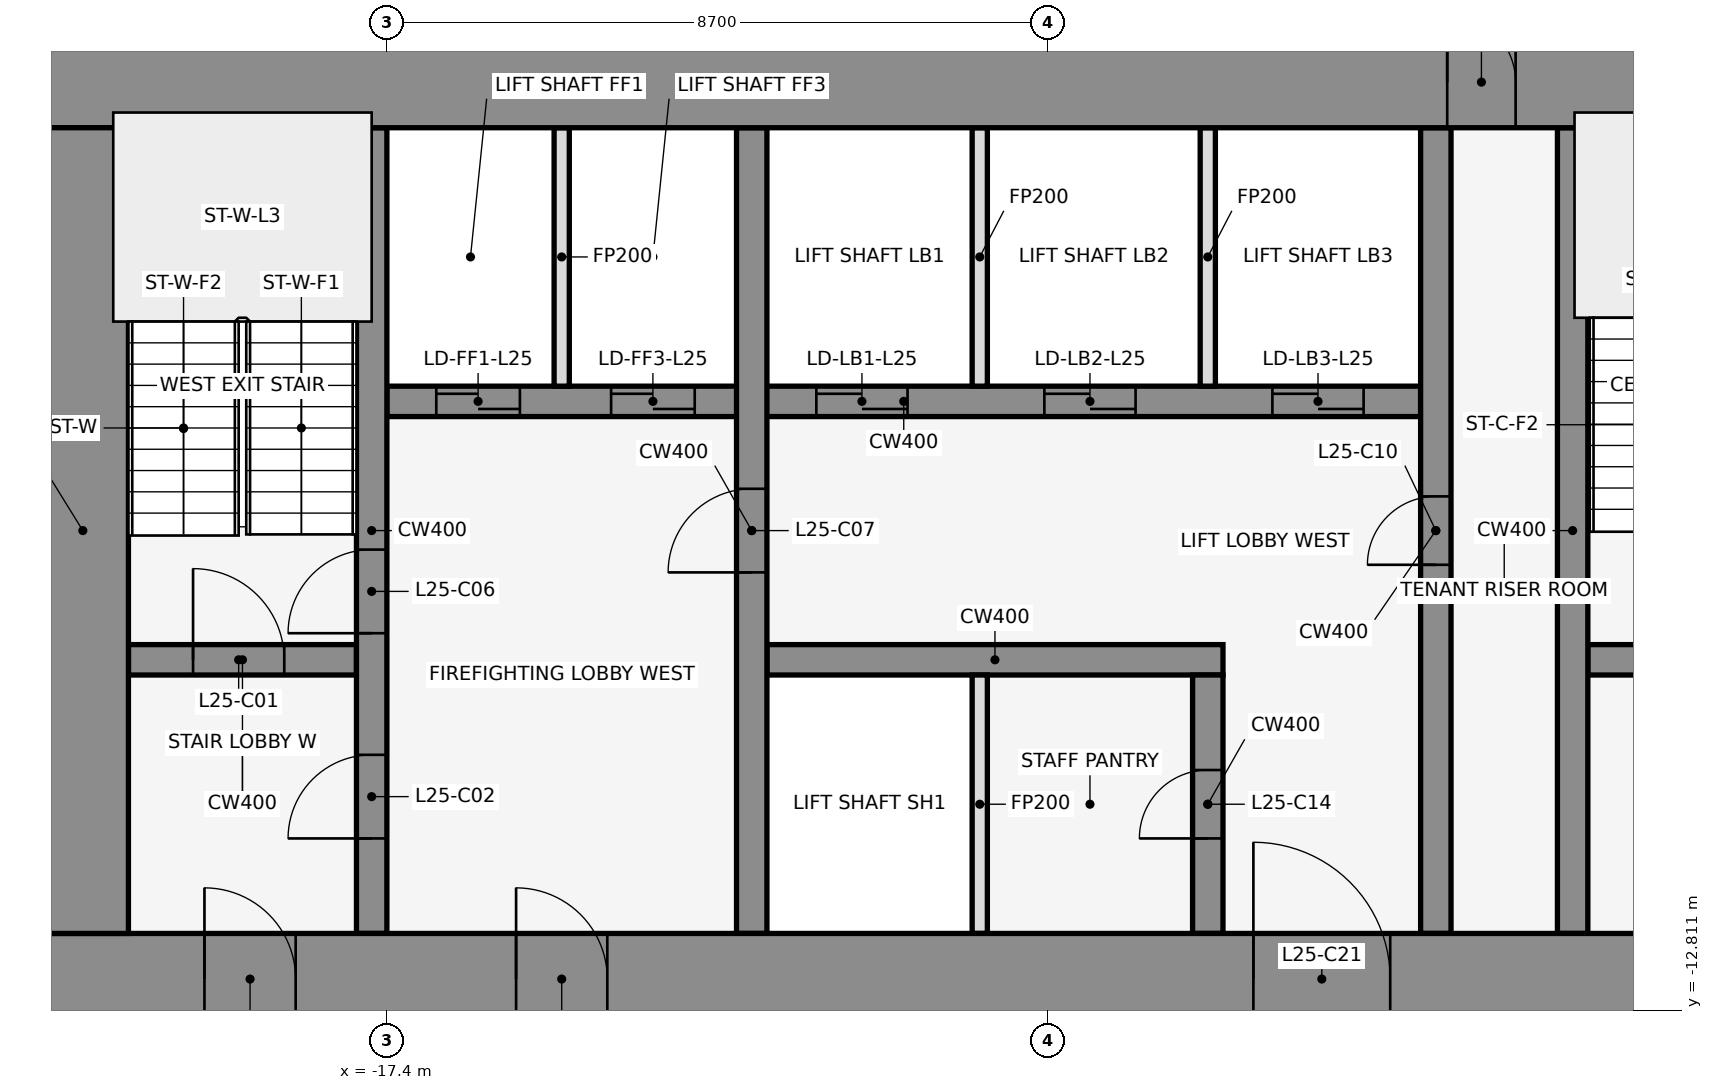
"""IFC4 building model, lengths in metres.
Left out: names, types, materials, properties, quantities, classifications, styles, units other than length and angle.
Written with IfcOpenShell. Run it as: python <this file> out.ifc"""

import sys

from ifc_helpers import new_model, si_unit, direction, frame, frame_2d, origin, place, context, subcontext, project, spatial, rectangle, extrude, element, fill, save


model = new_model("IFC4")
c1 = context("Model", 3, precision=1e-05, world=origin(), true_north=direction((0.0, 1.0)))
c2 = subcontext(c1, "Body", "Model", "MODEL_VIEW")
j1 = project(units=[si_unit("LENGTHUNIT", "METRE"), si_unit("PLANEANGLEUNIT", "RADIAN")], contexts=[c1])
p1 = place(None, origin())
s1 = spatial("IfcSite", under=j1, at=p1, CompositionType="ELEMENT")
p2 = place(p1, origin())
s2 = spatial("IfcBuilding", under=s1, at=p2, CompositionType="ELEMENT")
p3 = place(p2, frame((0.0, 0.0, 118.6)))
s3 = spatial("IfcBuildingStorey", under=s2, at=p3, CompositionType="ELEMENT", Elevation=118.6)
for number, where, z_axis, x_axis in (
    (1, (-0.068, -0.105, 0.0), (0.0, 0.0, 1.0), (-0.84, 0.543, 0.0)),
    (2, (-14.599, 1.08, 0.0), (0.0, 0.0, 1.0), (-0.84, -0.543, 0.0)),
):
    element("IfcWall", number, at=place(p3, frame(where, z_axis=z_axis, x_axis=x_axis)), inside=s3, PredefinedType="STANDARD", context=c2, shape_type="SweptSolid", body=[
        extrude(rectangle(XDim=2.183, YDim=0.25, at=frame_2d((1.091, 0.0))), origin(), (0.0, 0.0, 1.0), 3.95),
    ])
p4 = place(p3, frame((-20.8, -8.2, 0.0), z_axis=(0.0, 0.0, 1.0), x_axis=(1.0, 0.0, 0.0)))
e3 = element("IfcWall", 3, at=p4, inside=s3, PredefinedType="SHEAR", context=c2, shape_type="SweptSolid", body=[
    extrude(rectangle(XDim=3.0, YDim=0.4, at=frame_2d((1.5, 0.0))), origin(), (0.0, 0.0, 1.0), 4.1),
])
p5 = place(p4, frame((0.85, 0.0, 0.0)))
e4 = element("IfcOpeningElement", 4, at=p5, cuts=e3, PredefinedType="OPENING", context=c2, shape_type="SweptSolid", body=[
    extrude(rectangle(XDim=1.2, YDim=2.1, at=frame_2d((0.6, 1.05))), frame((0.0, 0.212, 0.0), z_axis=(0.0, -1.0, 0.0), x_axis=(1.0, 0.0, 0.0)), (0.0, 0.0, 1.0), 0.424),
])
p6 = place(p3, frame((-12.4, -8.2, 0.0), z_axis=(0.0, 0.0, 1.0), x_axis=(1.0, 0.0, 0.0)))
e5 = element("IfcWall", 5, at=p6, inside=s3, PredefinedType="SHEAR", context=c2, shape_type="SweptSolid", body=[
    extrude(rectangle(XDim=6.0, YDim=0.4, at=frame_2d((3.0, 0.0))), origin(), (0.0, 0.0, 1.0), 4.1),
])
p7 = place(p3, frame((-1.6, -8.2, 0.0), z_axis=(0.0, 0.0, 1.0), x_axis=(1.0, 0.0, 0.0)))
e6 = element("IfcWall", 6, at=p7, inside=s3, PredefinedType="SHEAR", context=c2, shape_type="SweptSolid", body=[
    extrude(rectangle(XDim=3.2, YDim=0.4, at=frame_2d((1.6, 0.0))), origin(), (0.0, 0.0, 1.0), 4.1),
])
p8 = place(p7, frame((1.05, 0.0, 0.0)))
e7 = element("IfcOpeningElement", 7, at=p8, cuts=e6, PredefinedType="OPENING", context=c2, shape_type="SweptSolid", body=[
    extrude(rectangle(XDim=1.2, YDim=2.1, at=frame_2d((0.6, 1.05))), frame((0.0, 0.212, 0.0), z_axis=(0.0, -1.0, 0.0), x_axis=(1.0, 0.0, 0.0)), (0.0, 0.0, 1.0), 0.424),
])
p9 = place(p3, frame((-17.4, -4.8, 0.0), z_axis=(0.0, 0.0, 1.0), x_axis=(1.0, 0.0, 0.0)))
e8 = element("IfcWall", 8, at=p9, inside=s3, PredefinedType="SHEAR", context=c2, shape_type="SweptSolid", body=[
    extrude(rectangle(XDim=13.6, YDim=0.4, at=frame_2d((6.8, 0.0))), origin(), (0.0, 0.0, 1.0), 4.1),
])
p10 = place(p9, frame((0.65, 0.0, 0.0)))
e9 = element("IfcOpeningElement", 9, at=p10, cuts=e8, PredefinedType="OPENING", context=c2, shape_type="SweptSolid", body=[
    extrude(rectangle(XDim=1.1, YDim=2.1, at=frame_2d((0.55, 1.05))), frame((0.0, 0.212, 0.0), z_axis=(0.0, -1.0, 0.0), x_axis=(1.0, 0.0, 0.0)), (0.0, 0.0, 1.0), 0.424),
])
p11 = place(p9, frame((2.95, 0.0, 0.0)))
e10 = element("IfcOpeningElement", 10, at=p11, cuts=e8, PredefinedType="OPENING", context=c2, shape_type="SweptSolid", body=[
    extrude(rectangle(XDim=1.1, YDim=2.1, at=frame_2d((0.55, 1.05))), frame((0.0, 0.212, 0.0), z_axis=(0.0, -1.0, 0.0), x_axis=(1.0, 0.0, 0.0)), (0.0, 0.0, 1.0), 0.424),
])
p12 = place(p9, frame((5.65, 0.0, 0.0)))
e11 = element("IfcOpeningElement", 11, at=p12, cuts=e8, PredefinedType="OPENING", context=c2, shape_type="SweptSolid", body=[
    extrude(rectangle(XDim=1.2, YDim=2.1, at=frame_2d((0.6, 1.05))), frame((0.0, 0.212, 0.0), z_axis=(0.0, -1.0, 0.0), x_axis=(1.0, 0.0, 0.0)), (0.0, 0.0, 1.0), 0.424),
])
p13 = place(p9, frame((8.65, 0.0, 0.0)))
e12 = element("IfcOpeningElement", 12, at=p13, cuts=e8, PredefinedType="OPENING", context=c2, shape_type="SweptSolid", body=[
    extrude(rectangle(XDim=1.2, YDim=2.1, at=frame_2d((0.6, 1.05))), frame((0.0, 0.212, 0.0), z_axis=(0.0, -1.0, 0.0), x_axis=(1.0, 0.0, 0.0)), (0.0, 0.0, 1.0), 0.424),
])
p14 = place(p9, frame((11.65, 0.0, 0.0)))
e13 = element("IfcOpeningElement", 13, at=p14, cuts=e8, PredefinedType="OPENING", context=c2, shape_type="SweptSolid", body=[
    extrude(rectangle(XDim=1.2, YDim=2.1, at=frame_2d((0.6, 1.05))), frame((0.0, 0.212, 0.0), z_axis=(0.0, -1.0, 0.0), x_axis=(1.0, 0.0, 0.0)), (0.0, 0.0, 1.0), 0.424),
])
p15 = place(p3, frame((-17.6, -11.8, 0.0), z_axis=(0.0, 0.0, 1.0), x_axis=(0.0, 1.0, 0.0)))
e14 = element("IfcWall", 14, at=p15, inside=s3, PredefinedType="SHEAR", context=c2, shape_type="SweptSolid", body=[
    extrude(rectangle(XDim=10.6, YDim=0.4, at=frame_2d((5.3, 0.0))), origin(), (0.0, 0.0, 1.0), 4.1),
])
p16 = place(p15, frame((1.25, 0.0, 0.0)))
e15 = element("IfcOpeningElement", 15, at=p16, cuts=e14, PredefinedType="OPENING", context=c2, shape_type="SweptSolid", body=[
    extrude(rectangle(XDim=1.1, YDim=2.1, at=frame_2d((0.55, 1.05))), frame((0.0, 0.212, 0.0), z_axis=(0.0, -1.0, 0.0), x_axis=(1.0, 0.0, 0.0)), (0.0, 0.0, 1.0), 0.424),
])
p17 = place(p15, frame((3.95, 0.0, 0.0)))
e16 = element("IfcOpeningElement", 16, at=p17, cuts=e14, PredefinedType="OPENING", context=c2, shape_type="SweptSolid", body=[
    extrude(rectangle(XDim=1.1, YDim=2.1, at=frame_2d((0.55, 1.05))), frame((0.0, 0.212, 0.0), z_axis=(0.0, -1.0, 0.0), x_axis=(1.0, 0.0, 0.0)), (0.0, 0.0, 1.0), 0.424),
])
p18 = place(p3, frame((-15.1, -4.6, 0.0), z_axis=(0.0, 0.0, 1.0), x_axis=(0.0, 1.0, 0.0)))
e17 = element("IfcWall", 17, at=p18, inside=s3, PredefinedType="PARTITIONING", context=c2, shape_type="SweptSolid", body=[
    extrude(rectangle(XDim=3.4, YDim=0.2, at=frame_2d((1.7, 0.0))), origin(), (0.0, 0.0, 1.0), 3.018),
])
p19 = place(p3, frame((-12.6, -11.8, 0.0), z_axis=(0.0, 0.0, 1.0), x_axis=(0.0, 1.0, 0.0)))
e18 = element("IfcWall", 18, at=p19, inside=s3, PredefinedType="SHEAR", context=c2, shape_type="SweptSolid", body=[
    extrude(rectangle(XDim=10.6, YDim=0.4, at=frame_2d((5.3, 0.0))), origin(), (0.0, 0.0, 1.0), 4.1),
])
p20 = place(p19, frame((4.75, 0.0, 0.0)))
e19 = element("IfcOpeningElement", 19, at=p20, cuts=e18, PredefinedType="OPENING", context=c2, shape_type="SweptSolid", body=[
    extrude(rectangle(XDim=1.1, YDim=2.1, at=frame_2d((0.55, 1.05))), frame((0.0, 0.212, 0.0), z_axis=(0.0, -1.0, 0.0), x_axis=(1.0, 0.0, 0.0)), (0.0, 0.0, 1.0), 0.424),
])
for number, where, z_axis, x_axis in (
    (20, (-9.6, -11.8, 0.0), (0.0, 0.0, 1.0), (0.0, 1.0, 0.0)),
    (21, (-9.6, -4.6, 0.0), (0.0, 0.0, 1.0), (0.0, 1.0, 0.0)),
):
    element("IfcWall", number, at=place(p3, frame(where, z_axis=z_axis, x_axis=x_axis)), inside=s3, PredefinedType="PARTITIONING", context=c2, shape_type="SweptSolid", body=[
        extrude(rectangle(XDim=3.4, YDim=0.2, at=frame_2d((1.7, 0.0))), origin(), (0.0, 0.0, 1.0), 3.018),
    ])
p21 = place(p3, frame((-6.6, -11.8, 0.0), z_axis=(0.0, 0.0, 1.0), x_axis=(0.0, 1.0, 0.0)))
e22 = element("IfcWall", 22, at=p21, inside=s3, PredefinedType="SHEAR", context=c2, shape_type="SweptSolid", body=[
    extrude(rectangle(XDim=3.4, YDim=0.4, at=frame_2d((1.7, 0.0))), origin(), (0.0, 0.0, 1.0), 4.1),
])
p22 = place(p21, frame((1.25, 0.0, 0.0)))
e23 = element("IfcOpeningElement", 23, at=p22, cuts=e22, PredefinedType="OPENING", context=c2, shape_type="SweptSolid", body=[
    extrude(rectangle(XDim=0.9, YDim=2.1, at=frame_2d((0.45, 1.05))), frame((0.0, 0.212, 0.0), z_axis=(0.0, -1.0, 0.0), x_axis=(1.0, 0.0, 0.0)), (0.0, 0.0, 1.0), 0.424),
])
p23 = place(p3, frame((-6.6, -4.6, 0.0), z_axis=(0.0, 0.0, 1.0), x_axis=(0.0, 1.0, 0.0)))
e24 = element("IfcWall", 24, at=p23, inside=s3, PredefinedType="PARTITIONING", context=c2, shape_type="SweptSolid", body=[
    extrude(rectangle(XDim=3.4, YDim=0.2, at=frame_2d((1.7, 0.0))), origin(), (0.0, 0.0, 1.0), 3.018),
])
p24 = place(p3, frame((-3.6, -11.8, 0.0), z_axis=(0.0, 0.0, 1.0), x_axis=(0.0, 1.0, 0.0)))
e25 = element("IfcWall", 25, at=p24, inside=s3, PredefinedType="SHEAR", context=c2, shape_type="SweptSolid", body=[
    extrude(rectangle(XDim=10.6, YDim=0.4, at=frame_2d((5.3, 0.0))), origin(), (0.0, 0.0, 1.0), 4.1),
])
p25 = place(p24, frame((4.85, 0.0, 0.0)))
e26 = element("IfcOpeningElement", 26, at=p25, cuts=e25, PredefinedType="OPENING", context=c2, shape_type="SweptSolid", body=[
    extrude(rectangle(XDim=0.9, YDim=2.1, at=frame_2d((0.45, 1.05))), frame((0.0, 0.212, 0.0), z_axis=(0.0, -1.0, 0.0), x_axis=(1.0, 0.0, 0.0)), (0.0, 0.0, 1.0), 0.424),
])
p26 = place(p3, frame((-1.8, -11.8, 0.0), z_axis=(0.0, 0.0, 1.0), x_axis=(0.0, 1.0, 0.0)))
e27 = element("IfcWall", 27, at=p26, inside=s3, PredefinedType="SHEAR", context=c2, shape_type="SweptSolid", body=[
    extrude(rectangle(XDim=10.6, YDim=0.4, at=frame_2d((5.3, 0.0))), origin(), (0.0, 0.0, 1.0), 4.1),
])
p27 = place(p3, frame((-22.0, -0.6, 0.0), z_axis=(0.0, 0.0, 1.0), x_axis=(1.0, 0.0, 0.0)))
e28 = element("IfcWall", 28, at=p27, inside=s3, PredefinedType="SHEAR", context=c2, shape_type="SweptSolid", body=[
    extrude(rectangle(XDim=44.0, YDim=1.2, at=frame_2d((22.0, 0.0))), origin(), (0.0, 0.0, 1.0), 4.1),
])
p28 = place(p27, frame((18.55, 0.0, 0.0)))
e29 = element("IfcOpeningElement", 29, at=p28, cuts=e28, PredefinedType="OPENING", context=c2, shape_type="SweptSolid", body=[
    extrude(rectangle(XDim=0.9, YDim=2.1, at=frame_2d((0.45, 1.05))), frame((0.0, 0.612, 0.0), z_axis=(0.0, -1.0, 0.0), x_axis=(1.0, 0.0, 0.0)), (0.0, 0.0, 1.0), 1.224),
])
p29 = place(p27, frame((24.55, 0.0, 0.0)))
e30 = element("IfcOpeningElement", 30, at=p29, cuts=e28, PredefinedType="OPENING", context=c2, shape_type="SweptSolid", body=[
    extrude(rectangle(XDim=0.9, YDim=2.1, at=frame_2d((0.45, 1.05))), frame((0.0, 0.612, 0.0), z_axis=(0.0, -1.0, 0.0), x_axis=(1.0, 0.0, 0.0)), (0.0, 0.0, 1.0), 1.224),
])
p30 = place(p3, frame((-22.0, -12.4, 0.0), z_axis=(0.0, 0.0, 1.0), x_axis=(1.0, 0.0, 0.0)))
e31 = element("IfcWall", 31, at=p30, inside=s3, PredefinedType="SHEAR", context=c2, shape_type="SweptSolid", body=[
    extrude(rectangle(XDim=44.0, YDim=1.2, at=frame_2d((22.0, 0.0))), origin(), (0.0, 0.0, 1.0), 4.1),
])
p31 = place(p30, frame((2.2, 0.0, 0.0)))
e32 = element("IfcOpeningElement", 32, at=p31, cuts=e31, PredefinedType="OPENING", context=c2, shape_type="SweptSolid", body=[
    extrude(rectangle(XDim=1.2, YDim=2.1, at=frame_2d((0.6, 1.05))), frame((0.0, 0.612, 0.0), z_axis=(0.0, -1.0, 0.0), x_axis=(1.0, 0.0, 0.0)), (0.0, 0.0, 1.0), 1.224),
])
p32 = place(p30, frame((21.4, 0.0, 0.0)))
e33 = element("IfcOpeningElement", 33, at=p32, cuts=e31, PredefinedType="OPENING", context=c2, shape_type="SweptSolid", body=[
    extrude(rectangle(XDim=1.2, YDim=2.1, at=frame_2d((0.6, 1.05))), frame((0.0, 0.612, 0.0), z_axis=(0.0, -1.0, 0.0), x_axis=(1.0, 0.0, 0.0)), (0.0, 0.0, 1.0), 1.224),
])
p33 = place(p30, frame((40.6, 0.0, 0.0)))
e34 = element("IfcOpeningElement", 34, at=p33, cuts=e31, PredefinedType="OPENING", context=c2, shape_type="SweptSolid", body=[
    extrude(rectangle(XDim=1.2, YDim=2.1, at=frame_2d((0.6, 1.05))), frame((0.0, 0.612, 0.0), z_axis=(0.0, -1.0, 0.0), x_axis=(1.0, 0.0, 0.0)), (0.0, 0.0, 1.0), 1.224),
])
p34 = place(p30, frame((16.0, 0.0, 0.0)))
e35 = element("IfcOpeningElement", 35, at=p34, cuts=e31, PredefinedType="OPENING", context=c2, shape_type="SweptSolid", body=[
    extrude(rectangle(XDim=1.8, YDim=2.1, at=frame_2d((0.9, 1.05))), frame((0.0, 0.612, 0.0), z_axis=(0.0, -1.0, 0.0), x_axis=(1.0, 0.0, 0.0)), (0.0, 0.0, 1.0), 1.224),
])
p35 = place(p30, frame((6.3, 0.0, 0.0)))
e36 = element("IfcOpeningElement", 36, at=p35, cuts=e31, PredefinedType="OPENING", context=c2, shape_type="SweptSolid", body=[
    extrude(rectangle(XDim=1.2, YDim=2.1, at=frame_2d((0.6, 1.05))), frame((0.0, 0.612, 0.0), z_axis=(0.0, -1.0, 0.0), x_axis=(1.0, 0.0, 0.0)), (0.0, 0.0, 1.0), 1.224),
])
p36 = place(p30, frame((26.2, 0.0, 0.0)))
e37 = element("IfcOpeningElement", 37, at=p36, cuts=e31, PredefinedType="OPENING", context=c2, shape_type="SweptSolid", body=[
    extrude(rectangle(XDim=1.8, YDim=2.1, at=frame_2d((0.9, 1.05))), frame((0.0, 0.612, 0.0), z_axis=(0.0, -1.0, 0.0), x_axis=(1.0, 0.0, 0.0)), (0.0, 0.0, 1.0), 1.224),
])
p37 = place(p30, frame((36.5, 0.0, 0.0)))
e38 = element("IfcOpeningElement", 38, at=p37, cuts=e31, PredefinedType="OPENING", context=c2, shape_type="SweptSolid", body=[
    extrude(rectangle(XDim=1.2, YDim=2.1, at=frame_2d((0.6, 1.05))), frame((0.0, 0.612, 0.0), z_axis=(0.0, -1.0, 0.0), x_axis=(1.0, 0.0, 0.0)), (0.0, 0.0, 1.0), 1.224),
])
p38 = place(p3, frame((-21.4, -11.8, 0.0), z_axis=(0.0, 0.0, 1.0), x_axis=(0.0, 1.0, 0.0)))
e39 = element("IfcWall", 39, at=p38, inside=s3, PredefinedType="SHEAR", context=c2, shape_type="SweptSolid", body=[
    extrude(rectangle(XDim=10.6, YDim=1.2, at=frame_2d((5.3, 0.0))), origin(), (0.0, 0.0, 1.0), 4.1),
])
p39 = place(p5, origin())
e40 = element("IfcDoor", 40, at=p39, inside=s3, OperationType="SINGLE_SWING_LEFT", PredefinedType="DOOR", context=c2, shape_type="SweptSolid", body=[
    extrude(rectangle(XDim=1.2, YDim=2.1, at=frame_2d((0.6, 1.05))), frame((0.0, 0.025, 0.0), z_axis=(0.0, -1.0, 0.0), x_axis=(1.0, 0.0, 0.0)), (0.0, 0.0, 1.0), 0.05),
])
fill(e4, e40)
p40 = place(p16, frame((1.1, 0.0, 0.0), z_axis=(0.0, 0.0, 1.0), x_axis=(-1.0, 0.0, 0.0)))
e41 = element("IfcDoor", 41, at=p40, inside=s3, OperationType="SINGLE_SWING_LEFT", PredefinedType="DOOR", context=c2, shape_type="SweptSolid", body=[
    extrude(rectangle(XDim=1.1, YDim=2.1, at=frame_2d((0.55, 1.05))), frame((0.0, 0.025, 0.0), z_axis=(0.0, -1.0, 0.0), x_axis=(1.0, 0.0, 0.0)), (0.0, 0.0, 1.0), 0.05),
])
fill(e15, e41)
p41 = place(p10, origin())
e42 = element("IfcDoor", 42, at=p41, inside=s3, OperationType="DOUBLE_DOOR_SLIDING", PredefinedType="DOOR", context=c2, shape_type="SweptSolid", body=[
    extrude(rectangle(XDim=1.1, YDim=2.1, at=frame_2d((0.55, 1.05))), frame((0.0, 0.025, 0.0), z_axis=(0.0, -1.0, 0.0), x_axis=(1.0, 0.0, 0.0)), (0.0, 0.0, 1.0), 0.05),
])
fill(e9, e42)
p42 = place(p11, origin())
e43 = element("IfcDoor", 43, at=p42, inside=s3, OperationType="DOUBLE_DOOR_SLIDING", PredefinedType="DOOR", context=c2, shape_type="SweptSolid", body=[
    extrude(rectangle(XDim=1.1, YDim=2.1, at=frame_2d((0.55, 1.05))), frame((0.0, 0.025, 0.0), z_axis=(0.0, -1.0, 0.0), x_axis=(1.0, 0.0, 0.0)), (0.0, 0.0, 1.0), 0.05),
])
fill(e10, e43)
p43 = place(p12, origin())
e44 = element("IfcDoor", 44, at=p43, inside=s3, OperationType="DOUBLE_DOOR_SLIDING", PredefinedType="DOOR", context=c2, shape_type="SweptSolid", body=[
    extrude(rectangle(XDim=1.2, YDim=2.1, at=frame_2d((0.6, 1.05))), frame((0.0, 0.025, 0.0), z_axis=(0.0, -1.0, 0.0), x_axis=(1.0, 0.0, 0.0)), (0.0, 0.0, 1.0), 0.05),
])
fill(e11, e44)
p44 = place(p13, origin())
e45 = element("IfcDoor", 45, at=p44, inside=s3, OperationType="DOUBLE_DOOR_SLIDING", PredefinedType="DOOR", context=c2, shape_type="SweptSolid", body=[
    extrude(rectangle(XDim=1.2, YDim=2.1, at=frame_2d((0.6, 1.05))), frame((0.0, 0.025, 0.0), z_axis=(0.0, -1.0, 0.0), x_axis=(1.0, 0.0, 0.0)), (0.0, 0.0, 1.0), 0.05),
])
fill(e12, e45)
p45 = place(p14, origin())
e46 = element("IfcDoor", 46, at=p45, inside=s3, OperationType="DOUBLE_DOOR_SLIDING", PredefinedType="DOOR", context=c2, shape_type="SweptSolid", body=[
    extrude(rectangle(XDim=1.2, YDim=2.1, at=frame_2d((0.6, 1.05))), frame((0.0, 0.025, 0.0), z_axis=(0.0, -1.0, 0.0), x_axis=(1.0, 0.0, 0.0)), (0.0, 0.0, 1.0), 0.05),
])
fill(e13, e46)
p46 = place(p17, frame((1.1, 0.0, 0.0), z_axis=(0.0, 0.0, 1.0), x_axis=(-1.0, 0.0, 0.0)))
e47 = element("IfcDoor", 47, at=p46, inside=s3, OperationType="SINGLE_SWING_LEFT", PredefinedType="DOOR", context=c2, shape_type="SweptSolid", body=[
    extrude(rectangle(XDim=1.1, YDim=2.1, at=frame_2d((0.55, 1.05))), frame((0.0, 0.025, 0.0), z_axis=(0.0, -1.0, 0.0), x_axis=(1.0, 0.0, 0.0)), (0.0, 0.0, 1.0), 0.05),
])
fill(e16, e47)
p47 = place(p20, origin())
e48 = element("IfcDoor", 48, at=p47, inside=s3, OperationType="SINGLE_SWING_LEFT", PredefinedType="DOOR", context=c2, shape_type="SweptSolid", body=[
    extrude(rectangle(XDim=1.1, YDim=2.1, at=frame_2d((0.55, 1.05))), frame((0.0, 0.025, 0.0), z_axis=(0.0, -1.0, 0.0), x_axis=(1.0, 0.0, 0.0)), (0.0, 0.0, 1.0), 0.05),
])
fill(e19, e48)
p48 = place(p25, frame((0.9, 0.0, 0.0), z_axis=(0.0, 0.0, 1.0), x_axis=(-1.0, 0.0, 0.0)))
e49 = element("IfcDoor", 49, at=p48, inside=s3, OperationType="SINGLE_SWING_LEFT", PredefinedType="DOOR", context=c2, shape_type="SweptSolid", body=[
    extrude(rectangle(XDim=0.9, YDim=2.1, at=frame_2d((0.45, 1.05))), frame((0.0, 0.025, 0.0), z_axis=(0.0, -1.0, 0.0), x_axis=(1.0, 0.0, 0.0)), (0.0, 0.0, 1.0), 0.05),
])
fill(e26, e49)
p49 = place(p22, origin())
e50 = element("IfcDoor", 50, at=p49, inside=s3, OperationType="SINGLE_SWING_RIGHT", PredefinedType="DOOR", context=c2, shape_type="SweptSolid", body=[
    extrude(rectangle(XDim=0.9, YDim=2.1, at=frame_2d((0.45, 1.05))), frame((0.0, 0.025, 0.0), z_axis=(0.0, -1.0, 0.0), x_axis=(1.0, 0.0, 0.0)), (0.0, 0.0, 1.0), 0.05),
])
fill(e23, e50)
p50 = place(p28, origin())
e51 = element("IfcDoor", 51, at=p50, inside=s3, OperationType="SINGLE_SWING_LEFT", PredefinedType="DOOR", context=c2, shape_type="SweptSolid", body=[
    extrude(rectangle(XDim=0.9, YDim=2.1, at=frame_2d((0.45, 1.05))), frame((0.0, 0.025, 0.0), z_axis=(0.0, -1.0, 0.0), x_axis=(1.0, 0.0, 0.0)), (0.0, 0.0, 1.0), 0.05),
])
fill(e29, e51)
p51 = place(p31, frame((1.2, 0.0, 0.0), z_axis=(0.0, 0.0, 1.0), x_axis=(-1.0, 0.0, 0.0)))
e52 = element("IfcDoor", 52, at=p51, inside=s3, OperationType="SINGLE_SWING_RIGHT", PredefinedType="DOOR", context=c2, shape_type="SweptSolid", body=[
    extrude(rectangle(XDim=1.2, YDim=2.1, at=frame_2d((0.6, 1.05))), frame((0.0, 0.025, 0.0), z_axis=(0.0, -1.0, 0.0), x_axis=(1.0, 0.0, 0.0)), (0.0, 0.0, 1.0), 0.05),
])
fill(e32, e52)
p52 = place(p34, origin())
e53 = element("IfcDoor", 53, at=p52, inside=s3, OperationType="SINGLE_SWING_LEFT", PredefinedType="DOOR", context=c2, shape_type="SweptSolid", body=[
    extrude(rectangle(XDim=1.8, YDim=2.1, at=frame_2d((0.9, 1.05))), frame((0.0, 0.025, 0.0), z_axis=(0.0, -1.0, 0.0), x_axis=(1.0, 0.0, 0.0)), (0.0, 0.0, 1.0), 0.05),
])
fill(e35, e53)
p53 = place(p35, frame((1.2, 0.0, 0.0), z_axis=(0.0, 0.0, 1.0), x_axis=(-1.0, 0.0, 0.0)))
e54 = element("IfcDoor", 54, at=p53, inside=s3, OperationType="SINGLE_SWING_RIGHT", PredefinedType="DOOR", context=c2, shape_type="SweptSolid", body=[
    extrude(rectangle(XDim=1.2, YDim=2.1, at=frame_2d((0.6, 1.05))), frame((0.0, 0.025, 0.0), z_axis=(0.0, -1.0, 0.0), x_axis=(1.0, 0.0, 0.0)), (0.0, 0.0, 1.0), 0.05),
])
fill(e36, e54)
save(model, sys.argv[1])
